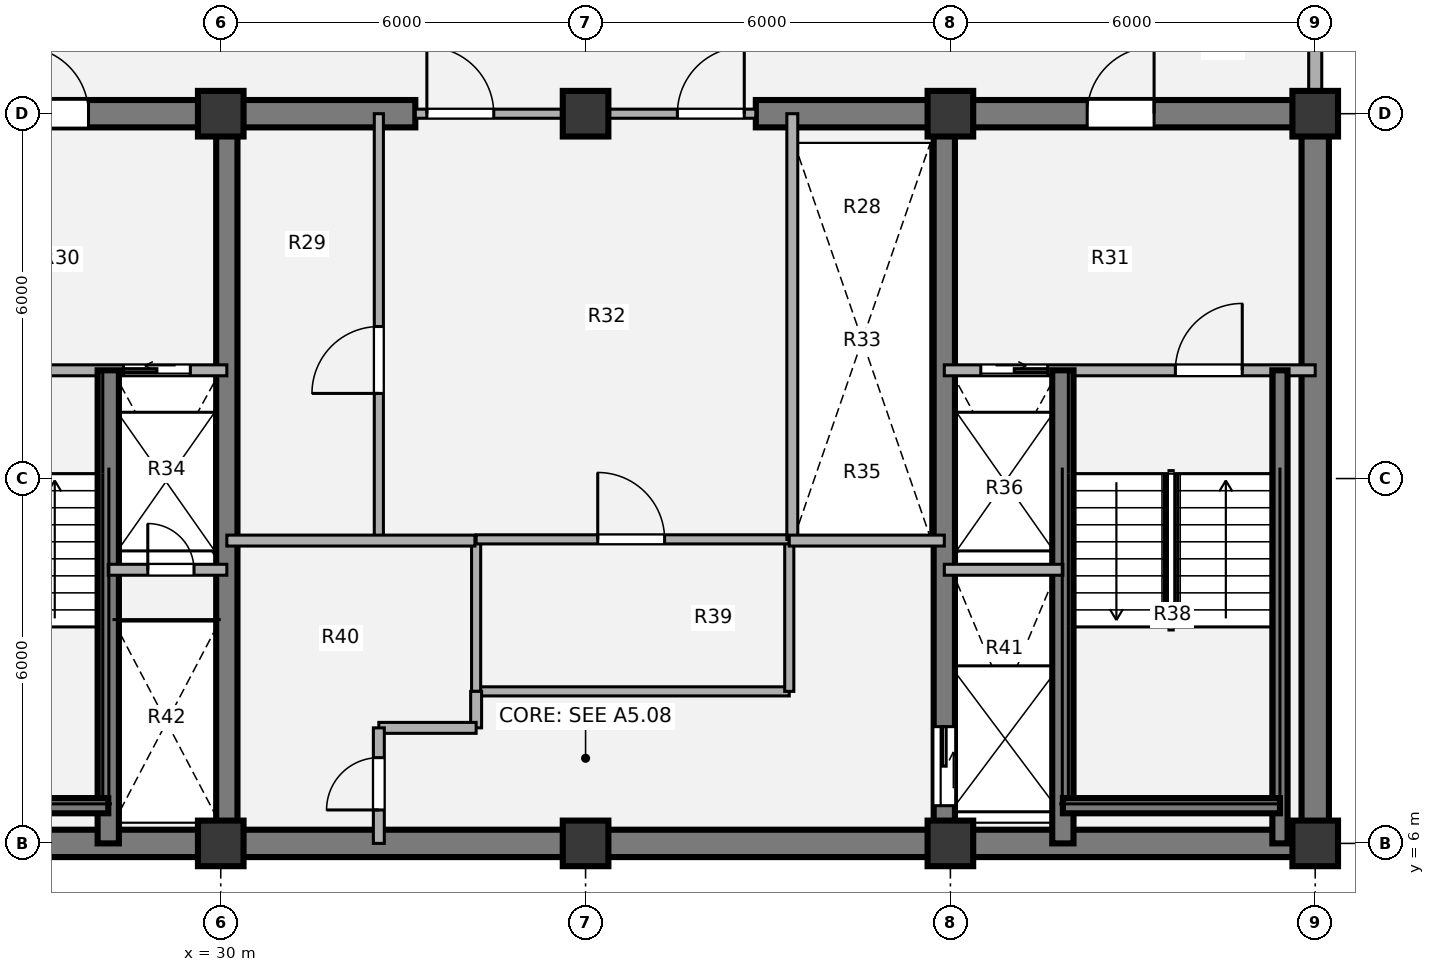
"""IFC4 building model, lengths in metres.
Left out: names, types, materials, properties, quantities, classifications, styles, units other than length and angle.
Written with IfcOpenShell. Run it as: python <this file> out.ifc"""

import sys

from ifc_helpers import new_model, si_unit, direction, frame, frame_2d, origin, origin_2d, place, context, subcontext, project, spatial, rectangle, extrude, source, transform, mapped, element, fill, save


model = new_model("IFC4")
c1 = context("Model", 3, precision=1e-05, world=origin(), true_north=direction((0.0, 1.0)))
c2 = subcontext(c1, "Body", "Model", "MODEL_VIEW")
j1 = project(units=[si_unit("LENGTHUNIT", "METRE"), si_unit("PLANEANGLEUNIT", "RADIAN")], contexts=[c1])
p1 = place(None, origin())
s1 = spatial("IfcSite", under=j1, at=p1, CompositionType="ELEMENT")
p2 = place(p1, origin())
s2 = spatial("IfcBuilding", under=s1, at=p2, CompositionType="ELEMENT")
p3 = place(p2, frame((0.0, 0.0, 198.0)))
s3 = spatial("IfcBuildingStorey", under=s2, at=p3, CompositionType="ELEMENT", Elevation=198.0)
m1 = source(origin(), c2, "Body", "SweptSolid", [
    extrude(rectangle(XDim=0.75, YDim=0.75, at=origin_2d()), origin(), (0.0, 0.0, 1.0), 3.78),
])
for number, where, z_axis, x_axis in (
    (1, (30.0, 6.0, 0.0), (0.0, 0.0, 1.0), (1.0, 0.0, 0.0)),
    (2, (36.0, 6.0, 0.0), (0.0, 0.0, 1.0), (1.0, 0.0, 0.0)),
    (3, (42.0, 6.0, 0.0), (0.0, 0.0, 1.0), (1.0, 0.0, 0.0)),
    (4, (48.0, 6.0, 0.0), (0.0, 0.0, 1.0), (1.0, 0.0, 0.0)),
    (5, (30.0, 18.0, 0.0), (0.0, 0.0, 1.0), (1.0, 0.0, 0.0)),
    (6, (36.0, 18.0, 0.0), (0.0, 0.0, 1.0), (1.0, 0.0, 0.0)),
    (7, (42.0, 18.0, 0.0), (0.0, 0.0, 1.0), (1.0, 0.0, 0.0)),
    (8, (48.0, 18.0, 0.0), (0.0, 0.0, 1.0), (1.0, 0.0, 0.0)),
):
    element("IfcColumn", number, at=place(p3, frame(where, z_axis=z_axis, x_axis=x_axis)), inside=s3, PredefinedType="COLUMN", context=c2, shape_type="MappedRepresentation", body=[
        mapped(m1, transform((0.0, 0.0, 0.0), x_axis=(1.0, 0.0, 0.0), y_axis=(0.0, 1.0, 0.0), z_axis=(0.0, 0.0, 1.0), scale=1.0)),
    ])
p4 = place(p3, frame((48.225, 6.0, 0.0), z_axis=(0.0, 0.0, 1.0), x_axis=(-1.0, 0.0, 0.0)))
e9 = element("IfcWall", 9, at=p4, inside=s3, PredefinedType="SHEAR", context=c2, shape_type="SweptSolid", body=[
    extrude(rectangle(XDim=24.45, YDim=0.45, at=frame_2d((12.225, 0.0))), origin(), (0.0, 0.0, 1.0), 3.78),
])
p5 = place(p3, frame((48.0, 18.0, 0.0), z_axis=(0.0, 0.0, 1.0), x_axis=(0.0, -1.0, 0.0)))
e10 = element("IfcWall", 10, at=p5, inside=s3, PredefinedType="SHEAR", context=c2, shape_type="SweptSolid", body=[
    extrude(rectangle(XDim=12.0, YDim=0.45, at=frame_2d((6.0, 0.0))), origin(), (0.0, 0.0, 1.0), 3.78),
])
p6 = place(p3, frame((23.775, 18.0, 0.0), z_axis=(0.0, 0.0, 1.0), x_axis=(1.0, 0.0, 0.0)))
e11 = element("IfcWall", 11, at=p6, inside=s3, PredefinedType="SHEAR", context=c2, shape_type="SweptSolid", body=[
    extrude(rectangle(XDim=9.425, YDim=0.45, at=frame_2d((4.712, 0.0))), origin(), (0.0, 0.0, 1.0), 3.78),
])
p7 = place(p6, frame((2.95, 0.0, 0.0)))
e12 = element("IfcOpeningElement", 12, at=p7, cuts=e11, PredefinedType="OPENING", context=c2, shape_type="SweptSolid", body=[
    extrude(rectangle(XDim=1.1, YDim=2.1, at=origin_2d()), frame((0.55, 0.235, 1.05), z_axis=(0.0, -1.0, 0.0), x_axis=(1.0, 0.0, 0.0)), (0.0, 0.0, 1.0), 0.47),
])
p8 = place(p3, frame((38.8, 18.0, 0.0), z_axis=(0.0, 0.0, 1.0), x_axis=(1.0, 0.0, 0.0)))
e13 = element("IfcWall", 13, at=p8, inside=s3, PredefinedType="SHEAR", context=c2, shape_type="SweptSolid", body=[
    extrude(rectangle(XDim=9.425, YDim=0.45, at=frame_2d((4.712, 0.0))), origin(), (0.0, 0.0, 1.0), 3.78),
])
p9 = place(p8, frame((5.45, 0.0, 0.0)))
e14 = element("IfcOpeningElement", 14, at=p9, cuts=e13, PredefinedType="OPENING", context=c2, shape_type="SweptSolid", body=[
    extrude(rectangle(XDim=1.1, YDim=2.1, at=origin_2d()), frame((0.55, 0.235, 1.05), z_axis=(0.0, -1.0, 0.0), x_axis=(1.0, 0.0, 0.0)), (0.0, 0.0, 1.0), 0.47),
])
p10 = place(p3, frame((30.1, 6.0, 0.0), z_axis=(0.0, 0.0, 1.0), x_axis=(0.0, 1.0, 0.0)))
e15 = element("IfcWall", 15, at=p10, inside=s3, PredefinedType="SHEAR", context=c2, shape_type="SweptSolid", body=[
    extrude(rectangle(XDim=12.0, YDim=0.35, at=frame_2d((6.0, 0.0))), origin(), (0.0, 0.0, 1.0), 3.78),
])
p11 = place(p3, frame((41.9, 18.0, 0.0), z_axis=(0.0, 0.0, 1.0), x_axis=(0.0, -1.0, 0.0)))
e16 = element("IfcWall", 16, at=p11, inside=s3, PredefinedType="SHEAR", context=c2, shape_type="SweptSolid", body=[
    extrude(rectangle(XDim=12.0, YDim=0.35, at=frame_2d((6.0, 0.0))), origin(), (0.0, 0.0, 1.0), 3.78),
])
p12 = place(p11, frame((10.08, 0.0, 0.0)))
e17 = element("IfcOpeningElement", 17, at=p12, cuts=e16, PredefinedType="OPENING", context=c2, shape_type="SweptSolid", body=[
    extrude(rectangle(XDim=1.3, YDim=2.1, at=origin_2d()), frame((0.65, 0.185, 1.05), z_axis=(0.0, -1.0, 0.0), x_axis=(1.0, 0.0, 0.0)), (0.0, 0.0, 1.0), 0.37),
])
p13 = place(p3, frame((48.0, 21.05, 0.0), z_axis=(0.0, 0.0, 1.0), x_axis=(0.0, -1.0, 0.0)))
e18 = element("IfcWall", 18, at=p13, inside=s3, PredefinedType="SOLIDWALL", context=c2, shape_type="SweptSolid", body=[
    extrude(rectangle(XDim=2.695, YDim=0.215, at=frame_2d((1.348, 0.0))), origin(), (0.0, 0.0, 1.0), 2.718),
])
p14 = place(p3, frame((32.6, 11.0, 0.0), z_axis=(0.0, 0.0, 1.0), x_axis=(0.0, 1.0, 0.0)))
e19 = element("IfcWall", 19, at=p14, inside=s3, PredefinedType="PARTITIONING", context=c2, shape_type="SweptSolid", body=[
    extrude(rectangle(XDim=7.0, YDim=0.15, at=frame_2d((3.5, 0.0))), origin(), (0.0, 0.0, 1.0), 3.5),
])
p15 = place(p14, frame((2.4, 0.0, 0.0)))
e20 = element("IfcOpeningElement", 20, at=p15, cuts=e19, PredefinedType="OPENING", context=c2, shape_type="SweptSolid", body=[
    extrude(rectangle(XDim=1.1, YDim=2.1, at=origin_2d()), frame((0.55, 0.085, 1.05), z_axis=(0.0, -1.0, 0.0), x_axis=(1.0, 0.0, 0.0)), (0.0, 0.0, 1.0), 0.17),
])
p16 = place(p3, frame((34.2, 8.5, 0.0), z_axis=(0.0, 0.0, 1.0), x_axis=(1.0, 0.0, 0.0)))
e21 = element("IfcWall", 21, at=p16, inside=s3, PredefinedType="PARTITIONING", context=c2, shape_type="SweptSolid", body=[
    extrude(rectangle(XDim=5.15, YDim=0.15, at=frame_2d((2.575, 0.0))), origin(), (0.0, 0.0, 1.0), 3.5),
])
for number, where, z_axis, x_axis in (
    (22, (34.2, 8.5, 0.0), (0.0, 0.0, 1.0), (0.0, 1.0, 0.0)),
    (23, (39.35, 8.5, 0.0), (0.0, 0.0, 1.0), (0.0, 1.0, 0.0)),
):
    element("IfcWall", number, at=place(p3, frame(where, z_axis=z_axis, x_axis=x_axis)), inside=s3, PredefinedType="PARTITIONING", context=c2, shape_type="SweptSolid", body=[
        extrude(rectangle(XDim=2.5, YDim=0.15, at=frame_2d((1.25, 0.0))), origin(), (0.0, 0.0, 1.0), 3.5),
    ])
p17 = place(p3, frame((34.2, 11.0, 0.0), z_axis=(0.0, 0.0, 1.0), x_axis=(1.0, 0.0, 0.0)))
e24 = element("IfcWall", 24, at=p17, inside=s3, PredefinedType="PARTITIONING", context=c2, shape_type="SweptSolid", body=[
    extrude(rectangle(XDim=5.15, YDim=0.15, at=frame_2d((2.575, 0.0))), origin(), (0.0, 0.0, 1.0), 3.5),
])
p18 = place(p17, frame((2.0, 0.0, 0.0)))
e25 = element("IfcOpeningElement", 25, at=p18, cuts=e24, PredefinedType="OPENING", context=c2, shape_type="SweptSolid", body=[
    extrude(rectangle(XDim=1.1, YDim=2.1, at=origin_2d()), frame((0.55, 0.085, 1.05), z_axis=(0.0, -1.0, 0.0), x_axis=(1.0, 0.0, 0.0)), (0.0, 0.0, 1.0), 0.17),
])
p19 = place(p3, frame((39.4, 11.0, 0.0), z_axis=(0.0, 0.0, 1.0), x_axis=(0.0, 1.0, 0.0)))
e26 = element("IfcWall", 26, at=p19, inside=s3, PredefinedType="PARTITIONING", context=c2, shape_type="SweptSolid", body=[
    extrude(rectangle(XDim=7.0, YDim=0.18, at=frame_2d((3.5, 0.0))), origin(), (0.0, 0.0, 1.0), 3.5),
])
p20 = place(p3, frame((30.1, 10.98, 0.0), z_axis=(0.0, 0.0, 1.0), x_axis=(1.0, 0.0, 0.0)))
e27 = element("IfcWall", 27, at=p20, inside=s3, PredefinedType="PARTITIONING", context=c2, shape_type="SweptSolid", body=[
    extrude(rectangle(XDim=4.08, YDim=0.18, at=frame_2d((2.04, 0.0))), origin(), (0.0, 0.0, 1.0), 3.5),
])
p21 = place(p3, frame((34.2, 7.9, 0.0), z_axis=(0.0, 0.0, 1.0), x_axis=(0.0, 1.0, 0.0)))
e28 = element("IfcWall", 28, at=p21, inside=s3, PredefinedType="PARTITIONING", context=c2, shape_type="SweptSolid", body=[
    extrude(rectangle(XDim=0.6, YDim=0.18, at=frame_2d((0.3, 0.0))), origin(), (0.0, 0.0, 1.0), 3.5),
])
p22 = place(p3, frame((32.6, 7.9, 0.0), z_axis=(0.0, 0.0, 1.0), x_axis=(1.0, 0.0, 0.0)))
e29 = element("IfcWall", 29, at=p22, inside=s3, PredefinedType="PARTITIONING", context=c2, shape_type="SweptSolid", body=[
    extrude(rectangle(XDim=1.6, YDim=0.18, at=frame_2d((0.8, 0.0))), origin(), (0.0, 0.0, 1.0), 3.5),
])
p23 = place(p3, frame((32.6, 6.0, 0.0), z_axis=(0.0, 0.0, 1.0), x_axis=(0.0, 1.0, 0.0)))
e30 = element("IfcWall", 30, at=p23, inside=s3, PredefinedType="PARTITIONING", context=c2, shape_type="SweptSolid", body=[
    extrude(rectangle(XDim=1.9, YDim=0.18, at=frame_2d((0.95, 0.0))), origin(), (0.0, 0.0, 1.0), 3.5),
])
p24 = place(p23, frame((0.55, 0.0, 0.0)))
e31 = element("IfcOpeningElement", 31, at=p24, cuts=e30, PredefinedType="OPENING", context=c2, shape_type="SweptSolid", body=[
    extrude(rectangle(XDim=0.86, YDim=2.1, at=origin_2d()), frame((0.43, 0.1, 1.05), z_axis=(0.0, -1.0, 0.0), x_axis=(1.0, 0.0, 0.0)), (0.0, 0.0, 1.0), 0.2),
])
p25 = place(p3, frame((39.35, 10.98, 0.0), z_axis=(0.0, 0.0, 1.0), x_axis=(1.0, 0.0, 0.0)))
e32 = element("IfcWall", 32, at=p25, inside=s3, PredefinedType="PARTITIONING", context=c2, shape_type="SweptSolid", body=[
    extrude(rectangle(XDim=2.55, YDim=0.18, at=frame_2d((1.275, 0.0))), origin(), (0.0, 0.0, 1.0), 3.5),
])
p26 = place(p3, frame((33.2, 18.0, 0.0), z_axis=(0.0, 0.0, 1.0), x_axis=(1.0, 0.0, 0.0)))
e33 = element("IfcWall", 33, at=p26, inside=s3, PredefinedType="PARTITIONING", context=c2, shape_type="SweptSolid", body=[
    extrude(rectangle(XDim=5.6, YDim=0.15, at=frame_2d((2.8, 0.0))), origin(), (0.0, 0.0, 1.0), 2.515),
])
p27 = place(p26, frame((0.19, 0.0, 0.0)))
e34 = element("IfcOpeningElement", 34, at=p27, cuts=e33, PredefinedType="OPENING", context=c2, shape_type="SweptSolid", body=[
    extrude(rectangle(XDim=1.1, YDim=2.1, at=origin_2d()), frame((0.55, 0.085, 1.05), z_axis=(0.0, -1.0, 0.0), x_axis=(1.0, 0.0, 0.0)), (0.0, 0.0, 1.0), 0.17),
])
p28 = place(p26, frame((4.31, 0.0, 0.0)))
e35 = element("IfcOpeningElement", 35, at=p28, cuts=e33, PredefinedType="OPENING", context=c2, shape_type="SweptSolid", body=[
    extrude(rectangle(XDim=1.1, YDim=2.1, at=origin_2d()), frame((0.55, 0.085, 1.05), z_axis=(0.0, -1.0, 0.0), x_axis=(1.0, 0.0, 0.0)), (0.0, 0.0, 1.0), 0.17),
])
p29 = place(p3, frame((24.0, 13.78, 0.0), z_axis=(0.0, 0.0, 1.0), x_axis=(1.0, 0.0, 0.0)))
e36 = element("IfcWall", 36, at=p29, inside=s3, PredefinedType="PARTITIONING", context=c2, shape_type="SweptSolid", body=[
    extrude(rectangle(XDim=6.1, YDim=0.18, at=frame_2d((3.05, 0.0))), origin(), (0.0, 0.0, 1.0), 3.5),
])
p30 = place(p29, frame((1.15, 0.0, 0.0)))
e37 = element("IfcOpeningElement", 37, at=p30, cuts=e36, PredefinedType="OPENING", context=c2, shape_type="SweptSolid", body=[
    extrude(rectangle(XDim=1.1, YDim=2.1, at=origin_2d()), frame((0.55, 0.1, 1.05), z_axis=(0.0, -1.0, 0.0), x_axis=(1.0, 0.0, 0.0)), (0.0, 0.0, 1.0), 0.2),
])
p31 = place(p29, frame((4.4, 0.0, 0.0)))
e38 = element("IfcOpeningElement", 38, at=p31, cuts=e36, PredefinedType="OPENING", context=c2, shape_type="SweptSolid", body=[
    extrude(rectangle(XDim=1.1, YDim=2.1, at=origin_2d()), frame((0.55, 0.1, 1.05), z_axis=(0.0, -1.0, 0.0), x_axis=(1.0, 0.0, 0.0)), (0.0, 0.0, 1.0), 0.2),
])
p32 = place(p3, frame((28.15, 6.0, 0.0), z_axis=(0.0, 0.0, 1.0), x_axis=(0.0, 1.0, 0.0)))
e39 = element("IfcWall", 39, at=p32, inside=s3, PredefinedType="SHEAR", context=c2, shape_type="SweptSolid", body=[
    extrude(rectangle(XDim=7.78, YDim=0.35, at=frame_2d((3.89, 0.0))), origin(), (0.0, 0.0, 1.0), 3.85),
])
p33 = place(p3, frame((24.58, 6.62, 0.0), z_axis=(0.0, 0.0, 1.0), x_axis=(1.0, 0.0, 0.0)))
e40 = element("IfcWall", 40, at=p33, inside=s3, PredefinedType="SHEAR", context=c2, shape_type="SweptSolid", body=[
    extrude(rectangle(XDim=3.57, YDim=0.25, at=frame_2d((1.785, 0.0))), origin(), (0.0, 0.0, 1.0), 3.85),
])
p34 = place(p3, frame((28.15, 10.5, 0.0), z_axis=(0.0, 0.0, 1.0), x_axis=(1.0, 0.0, 0.0)))
e41 = element("IfcWall", 41, at=p34, inside=s3, PredefinedType="PARTITIONING", context=c2, shape_type="SweptSolid", body=[
    extrude(rectangle(XDim=1.95, YDim=0.18, at=frame_2d((0.975, 0.0))), origin(), (0.0, 0.0, 1.0), 3.5),
])
p35 = place(p34, frame((0.65, 0.0, 0.0)))
e42 = element("IfcOpeningElement", 42, at=p35, cuts=e41, PredefinedType="OPENING", context=c2, shape_type="SweptSolid", body=[
    extrude(rectangle(XDim=0.76, YDim=2.05, at=origin_2d()), frame((0.38, 0.1, 1.025), z_axis=(0.0, -1.0, 0.0), x_axis=(1.0, 0.0, 0.0)), (0.0, 0.0, 1.0), 0.2),
])
p36 = place(p3, frame((41.9, 13.78, 0.0), z_axis=(0.0, 0.0, 1.0), x_axis=(1.0, 0.0, 0.0)))
e43 = element("IfcWall", 43, at=p36, inside=s3, PredefinedType="PARTITIONING", context=c2, shape_type="SweptSolid", body=[
    extrude(rectangle(XDim=6.1, YDim=0.18, at=frame_2d((3.05, 0.0))), origin(), (0.0, 0.0, 1.0), 3.5),
])
p37 = place(p36, frame((0.6, 0.0, 0.0)))
e44 = element("IfcOpeningElement", 44, at=p37, cuts=e43, PredefinedType="OPENING", context=c2, shape_type="SweptSolid", body=[
    extrude(rectangle(XDim=1.1, YDim=2.1, at=origin_2d()), frame((0.55, 0.1, 1.05), z_axis=(0.0, -1.0, 0.0), x_axis=(1.0, 0.0, 0.0)), (0.0, 0.0, 1.0), 0.2),
])
p38 = place(p36, frame((3.8, 0.0, 0.0)))
e45 = element("IfcOpeningElement", 45, at=p38, cuts=e43, PredefinedType="OPENING", context=c2, shape_type="SweptSolid", body=[
    extrude(rectangle(XDim=1.1, YDim=2.1, at=origin_2d()), frame((0.55, 0.1, 1.05), z_axis=(0.0, -1.0, 0.0), x_axis=(1.0, 0.0, 0.0)), (0.0, 0.0, 1.0), 0.2),
])
p39 = place(p3, frame((43.85, 6.0, 0.0), z_axis=(0.0, 0.0, 1.0), x_axis=(0.0, 1.0, 0.0)))
e46 = element("IfcWall", 46, at=p39, inside=s3, PredefinedType="SHEAR", context=c2, shape_type="SweptSolid", body=[
    extrude(rectangle(XDim=7.78, YDim=0.35, at=frame_2d((3.89, 0.0))), origin(), (0.0, 0.0, 1.0), 3.85),
])
p40 = place(p3, frame((47.42, 6.0, 0.0), z_axis=(0.0, 0.0, 1.0), x_axis=(0.0, 1.0, 0.0)))
e47 = element("IfcWall", 47, at=p40, inside=s3, PredefinedType="SHEAR", context=c2, shape_type="SweptSolid", body=[
    extrude(rectangle(XDim=7.78, YDim=0.25, at=frame_2d((3.89, 0.0))), origin(), (0.0, 0.0, 1.0), 3.85),
])
p41 = place(p3, frame((43.85, 6.62, 0.0), z_axis=(0.0, 0.0, 1.0), x_axis=(1.0, 0.0, 0.0)))
e48 = element("IfcWall", 48, at=p41, inside=s3, PredefinedType="SHEAR", context=c2, shape_type="SweptSolid", body=[
    extrude(rectangle(XDim=3.57, YDim=0.25, at=frame_2d((1.785, 0.0))), origin(), (0.0, 0.0, 1.0), 3.85),
])
p42 = place(p3, frame((41.9, 10.5, 0.0), z_axis=(0.0, 0.0, 1.0), x_axis=(1.0, 0.0, 0.0)))
e49 = element("IfcWall", 49, at=p42, inside=s3, PredefinedType="PARTITIONING", context=c2, shape_type="SweptSolid", body=[
    extrude(rectangle(XDim=1.95, YDim=0.18, at=frame_2d((0.975, 0.0))), origin(), (0.0, 0.0, 1.0), 3.5),
])
m2 = source(origin(), c2, "Body", "SweptSolid", [
    extrude(rectangle(XDim=1.1, YDim=2.1, at=origin_2d()), frame((0.55, 0.025, 1.05), z_axis=(0.0, -1.0, 0.0), x_axis=(1.0, 0.0, 0.0)), (0.0, 0.0, 1.0), 0.05),
])
p43 = place(p15, origin())
e50 = element("IfcDoor", 50, at=p43, inside=s3, OperationType="SINGLE_SWING_LEFT", PredefinedType="DOOR", context=c2, shape_type="MappedRepresentation", body=[
    mapped(m2, transform((0.0, 0.0, 0.0), x_axis=(1.0, 0.0, 0.0), y_axis=(0.0, 1.0, 0.0), z_axis=(0.0, 0.0, 1.0), scale=1.0)),
])
fill(e20, e50)
p44 = place(p18, origin())
e51 = element("IfcDoor", 51, at=p44, inside=s3, OperationType="SINGLE_SWING_LEFT", PredefinedType="DOOR", context=c2, shape_type="MappedRepresentation", body=[
    mapped(m2, transform((0.0, 0.0, 0.0), x_axis=(1.0, 0.0, 0.0), y_axis=(0.0, 1.0, 0.0), z_axis=(0.0, 0.0, 1.0), scale=1.0)),
])
fill(e25, e51)
m3 = source(origin(), c2, "Body", "SweptSolid", [
    extrude(rectangle(XDim=0.86, YDim=2.1, at=origin_2d()), frame((0.43, 0.025, 1.05), z_axis=(0.0, -1.0, 0.0), x_axis=(1.0, 0.0, 0.0)), (0.0, 0.0, 1.0), 0.05),
])
p45 = place(p24, origin())
e52 = element("IfcDoor", 52, at=p45, inside=s3, OperationType="SINGLE_SWING_LEFT", PredefinedType="DOOR", context=c2, shape_type="MappedRepresentation", body=[
    mapped(m3, transform((0.0, 0.0, 0.0), x_axis=(1.0, 0.0, 0.0), y_axis=(0.0, 1.0, 0.0), z_axis=(0.0, 0.0, 1.0), scale=1.0)),
])
fill(e31, e52)
m4 = source(origin(), c2, "Body", "SweptSolid", [
    extrude(rectangle(XDim=1.1, YDim=2.1, at=origin_2d()), frame((0.55, 0.025, 1.05), z_axis=(0.0, -1.0, 0.0), x_axis=(1.0, 0.0, 0.0)), (0.0, 0.0, 1.0), 0.05),
])
p46 = place(p27, origin())
e53 = element("IfcDoor", 53, at=p46, inside=s3, OperationType="SINGLE_SWING_LEFT", PredefinedType="DOOR", context=c2, shape_type="MappedRepresentation", body=[
    mapped(m4, transform((0.0, 0.0, 0.0), x_axis=(1.0, 0.0, 0.0), y_axis=(0.0, 1.0, 0.0), z_axis=(0.0, 0.0, 1.0), scale=1.0)),
])
fill(e34, e53)
p47 = place(p28, origin())
e54 = element("IfcDoor", 54, at=p47, inside=s3, OperationType="SINGLE_SWING_RIGHT", PredefinedType="DOOR", context=c2, shape_type="MappedRepresentation", body=[
    mapped(m4, transform((0.0, 0.0, 0.0), x_axis=(1.0, 0.0, 0.0), y_axis=(0.0, 1.0, 0.0), z_axis=(0.0, 0.0, 1.0), scale=1.0)),
])
fill(e35, e54)
m5 = source(origin(), c2, "Body", "SweptSolid", [
    extrude(rectangle(XDim=1.1, YDim=2.1, at=origin_2d()), frame((0.55, 0.025, 1.05), z_axis=(0.0, -1.0, 0.0), x_axis=(1.0, 0.0, 0.0)), (0.0, 0.0, 1.0), 0.05),
])
p48 = place(p31, origin())
e55 = element("IfcDoor", 55, at=p48, inside=s3, OperationType="SLIDING_TO_LEFT", PredefinedType="DOOR", context=c2, shape_type="MappedRepresentation", body=[
    mapped(m5, transform((0.0, 0.0, 0.0), x_axis=(1.0, 0.0, 0.0), y_axis=(0.0, 1.0, 0.0), z_axis=(0.0, 0.0, 1.0), scale=1.0)),
])
fill(e38, e55)
m6 = source(origin(), c2, "Body", "SweptSolid", [
    extrude(rectangle(XDim=0.76, YDim=2.05, at=origin_2d()), frame((0.38, 0.025, 1.025), z_axis=(0.0, -1.0, 0.0), x_axis=(1.0, 0.0, 0.0)), (0.0, 0.0, 1.0), 0.05),
])
p49 = place(p35, origin())
e56 = element("IfcDoor", 56, at=p49, inside=s3, OperationType="SINGLE_SWING_LEFT", PredefinedType="DOOR", context=c2, shape_type="MappedRepresentation", body=[
    mapped(m6, transform((0.0, 0.0, 0.0), x_axis=(1.0, 0.0, 0.0), y_axis=(0.0, 1.0, 0.0), z_axis=(0.0, 0.0, 1.0), scale=1.0)),
])
fill(e42, e56)
p50 = place(p37, origin())
e57 = element("IfcDoor", 57, at=p50, inside=s3, OperationType="SLIDING_TO_RIGHT", PredefinedType="DOOR", context=c2, shape_type="MappedRepresentation", body=[
    mapped(m5, transform((0.0, 0.0, 0.0), x_axis=(1.0, 0.0, 0.0), y_axis=(0.0, 1.0, 0.0), z_axis=(0.0, 0.0, 1.0), scale=1.0)),
])
fill(e44, e57)
m7 = source(origin(), c2, "Body", "SweptSolid", [
    extrude(rectangle(XDim=1.1, YDim=2.1, at=origin_2d()), frame((0.55, 0.025, 1.05), z_axis=(0.0, -1.0, 0.0), x_axis=(1.0, 0.0, 0.0)), (0.0, 0.0, 1.0), 0.05),
])
p51 = place(p38, origin())
e58 = element("IfcDoor", 58, at=p51, inside=s3, OperationType="SINGLE_SWING_RIGHT", PredefinedType="DOOR", context=c2, shape_type="MappedRepresentation", body=[
    mapped(m7, transform((0.0, 0.0, 0.0), x_axis=(1.0, 0.0, 0.0), y_axis=(0.0, 1.0, 0.0), z_axis=(0.0, 0.0, 1.0), scale=1.0)),
])
fill(e45, e58)
m8 = source(origin(), c2, "Body", "SweptSolid", [
    extrude(rectangle(XDim=1.3, YDim=2.1, at=origin_2d()), frame((0.65, 0.025, 1.05), z_axis=(0.0, -1.0, 0.0), x_axis=(1.0, 0.0, 0.0)), (0.0, 0.0, 1.0), 0.05),
])
p52 = place(p12, origin())
e59 = element("IfcDoor", 59, at=p52, inside=s3, OperationType="SLIDING_TO_LEFT", PredefinedType="DOOR", context=c2, shape_type="MappedRepresentation", body=[
    mapped(m8, transform((0.0, 0.0, 0.0), x_axis=(1.0, 0.0, 0.0), y_axis=(0.0, 1.0, 0.0), z_axis=(0.0, 0.0, 1.0), scale=1.0)),
])
fill(e17, e59)
p53 = place(p7, origin())
e60 = element("IfcDoor", 60, at=p53, inside=s3, OperationType="SINGLE_SWING_LEFT", PredefinedType="DOOR", context=c2, shape_type="MappedRepresentation", body=[
    mapped(m4, transform((0.0, 0.0, 0.0), x_axis=(1.0, 0.0, 0.0), y_axis=(0.0, 1.0, 0.0), z_axis=(0.0, 0.0, 1.0), scale=1.0)),
])
fill(e12, e60)
p54 = place(p9, origin())
e61 = element("IfcDoor", 61, at=p54, inside=s3, OperationType="SINGLE_SWING_RIGHT", PredefinedType="DOOR", context=c2, shape_type="MappedRepresentation", body=[
    mapped(m4, transform((0.0, 0.0, 0.0), x_axis=(1.0, 0.0, 0.0), y_axis=(0.0, 1.0, 0.0), z_axis=(0.0, 0.0, 1.0), scale=1.0)),
])
fill(e14, e61)
save(model, sys.argv[1])
